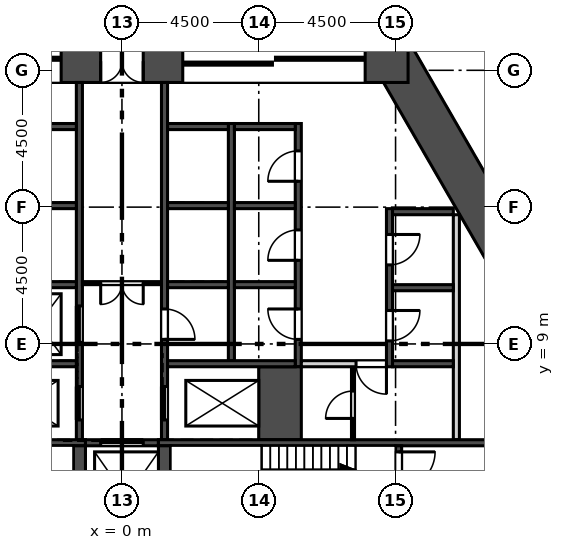
"""IFC4 building model, lengths in metres.
Left out: names, types, materials, properties, quantities, classifications, styles, units other than length and angle.
Written with IfcOpenShell. Run it as: python <this file> out.ifc"""

import sys

from ifc_helpers import new_model, si_unit, direction, frame, frame_2d, origin, place, context, subcontext, project, spatial, rectangle, extrude, element, fill, save


model = new_model("IFC4")
c1 = context("Model", 3, precision=1e-05, world=origin(), true_north=direction((0.0, 1.0)))
c2 = subcontext(c1, "Body", "Model", "MODEL_VIEW")
j1 = project(units=[si_unit("LENGTHUNIT", "METRE"), si_unit("PLANEANGLEUNIT", "RADIAN")], contexts=[c1])
p1 = place(None, origin())
s1 = spatial("IfcSite", under=j1, at=p1, CompositionType="ELEMENT")
p2 = place(p1, origin())
s2 = spatial("IfcBuilding", under=s1, at=p2, CompositionType="ELEMENT")
p3 = place(p2, frame((0.0, 0.0, 88.9)))
s3 = spatial("IfcBuildingStorey", under=s2, at=p3, CompositionType="ELEMENT", Elevation=88.9)
p4 = place(p3, frame((13.394, 10.703, 0.0), z_axis=(0.0, 0.0, 1.0), x_axis=(-0.50000187635, 0.866024320471, 0.0)))
e1 = element("IfcWall", 1, at=p4, inside=s3, PredefinedType="SHEAR", context=c2, shape_type="SweptSolid", body=[
    extrude(rectangle(XDim=9.177, YDim=1.4, at=frame_2d((4.588, 0.0))), origin(), (0.0, 0.0, 1.0), 7.2),
])
p5 = place(p3, frame((9.412, 18.3, 0.0), z_axis=(0.0, 0.0, 1.0), x_axis=(-1.0, 0.0, 0.0)))
e2 = element("IfcWall", 2, at=p5, inside=s3, PredefinedType="SHEAR", context=c2, shape_type="SweptSolid", body=[
    extrude(rectangle(XDim=18.823, YDim=1.4, at=frame_2d((9.412, 0.0))), origin(), (0.0, 0.0, 1.0), 7.2),
])
p6 = place(p5, frame((8.711, 0.0, 0.0)))
e3 = element("IfcOpeningElement", 3, at=p6, cuts=e2, PredefinedType="OPENING", context=c2, shape_type="SweptSolid", body=[
    extrude(rectangle(XDim=1.4, YDim=2.1, at=frame_2d((0.7, 1.05))), frame((0.0, 0.71, 0.0), z_axis=(0.0, -1.0, 0.0), x_axis=(1.0, 0.0, 0.0)), (0.0, 0.0, 1.0), 1.42),
])
p7 = place(p5, frame((11.412, 0.0, 0.0)))
e4 = element("IfcOpeningElement", 4, at=p7, cuts=e2, PredefinedType="OPENING", context=c2, shape_type="SweptSolid", body=[
    extrude(rectangle(XDim=6.0, YDim=2.4, at=frame_2d((3.0, 1.2))), frame((0.0, 0.71, 0.0), z_axis=(0.0, -1.0, 0.0), x_axis=(1.0, 0.0, 0.0)), (0.0, 0.0, 1.0), 1.42),
])
p8 = place(p5, frame((1.412, 0.0, 0.0)))
e5 = element("IfcOpeningElement", 5, at=p8, cuts=e2, PredefinedType="OPENING", context=c2, shape_type="SweptSolid", body=[
    extrude(rectangle(XDim=6.0, YDim=2.4, at=frame_2d((3.0, 1.2))), frame((0.0, 0.71, 0.0), z_axis=(0.0, -1.0, 0.0), x_axis=(1.0, 0.0, 0.0)), (0.0, 0.0, 1.0), 1.42),
])
p9 = place(p3, frame((30.863, 7.709, 0.0), z_axis=(0.0, 0.0, 1.0), x_axis=(-0.500000400847, 0.866025172355, 0.0)))
e6 = element("IfcWall", 6, at=p9, inside=s3, PredefinedType="SOLIDWALL", context=c2, shape_type="SweptSolid", body=[
    extrude(rectangle(XDim=53.021, YDim=0.34, at=frame_2d((26.51, 0.0))), origin(), (0.0, 0.0, 1.0), 6.8),
])
p10 = place(p9, frame((30.755, 0.0, 0.9)))
e7 = element("IfcOpeningElement", 7, at=p10, cuts=e6, PredefinedType="OPENING", context=c2, shape_type="SweptSolid", body=[
    extrude(rectangle(XDim=1.885, YDim=3.0, at=frame_2d((0.942, 1.5))), frame((0.0, 0.18, 0.0), z_axis=(0.0, -1.0, 0.0), x_axis=(1.0, 0.0, 0.0)), (0.0, 0.0, 1.0), 0.36),
])
p11 = place(p9, frame((36.755, 0.0, 0.9)))
e8 = element("IfcOpeningElement", 8, at=p11, cuts=e6, PredefinedType="OPENING", context=c2, shape_type="SweptSolid", body=[
    extrude(rectangle(XDim=1.885, YDim=3.0, at=frame_2d((0.942, 1.5))), frame((0.0, 0.18, 0.0), z_axis=(0.0, -1.0, 0.0), x_axis=(1.0, 0.0, 0.0)), (0.0, 0.0, 1.0), 0.36),
])
p12 = place(p9, frame((42.755, 0.0, 0.9)))
e9 = element("IfcOpeningElement", 9, at=p12, cuts=e6, PredefinedType="OPENING", context=c2, shape_type="SweptSolid", body=[
    extrude(rectangle(XDim=1.885, YDim=3.0, at=frame_2d((0.942, 1.5))), frame((0.0, 0.18, 0.0), z_axis=(0.0, -1.0, 0.0), x_axis=(1.0, 0.0, 0.0)), (0.0, 0.0, 1.0), 0.36),
])
p13 = place(p9, frame((48.755, 0.0, 0.9)))
e10 = element("IfcOpeningElement", 10, at=p13, cuts=e6, PredefinedType="OPENING", context=c2, shape_type="SweptSolid", body=[
    extrude(rectangle(XDim=1.885, YDim=3.0, at=frame_2d((0.942, 1.5))), frame((0.0, 0.18, 0.0), z_axis=(0.0, -1.0, 0.0), x_axis=(1.0, 0.0, 0.0)), (0.0, 0.0, 1.0), 0.36),
])
p14 = place(p3, frame((11.0, 5.85, 0.0), z_axis=(0.0, 0.0, 1.0), x_axis=(0.0, 1.0, 0.0)))
e11 = element("IfcWall", 11, at=p14, inside=s3, PredefinedType="SOLIDWALL", context=c2, shape_type="SweptSolid", body=[
    extrude(rectangle(XDim=7.4, YDim=0.2, at=frame_2d((3.7, 0.0))), origin(), (0.0, 0.0, 1.0), 6.8),
])
p15 = place(p3, frame((8.8, 8.25, -0.3), z_axis=(0.0, 0.0, 1.0), x_axis=(0.0, 1.0, 0.0)))
e12 = element("IfcWall", 12, at=p15, inside=s3, PredefinedType="SOLIDWALL", context=c2, shape_type="SweptSolid", body=[
    extrude(rectangle(XDim=5.2, YDim=0.2, at=frame_2d((2.6, 0.0))), origin(), (0.0, 0.0, 1.0), 7.1),
])
p16 = place(p15, frame((0.85, 0.0, 0.3)))
e13 = element("IfcOpeningElement", 13, at=p16, cuts=e12, PredefinedType="OPENING", context=c2, shape_type="SweptSolid", body=[
    extrude(rectangle(XDim=1.0, YDim=2.1, at=frame_2d((0.5, 1.05))), frame((0.0, 0.11, 0.0), z_axis=(0.0, -1.0, 0.0), x_axis=(1.0, 0.0, 0.0)), (0.0, 0.0, 1.0), 0.22),
])
p17 = place(p15, frame((3.35, 0.0, 0.3)))
e14 = element("IfcOpeningElement", 14, at=p17, cuts=e12, PredefinedType="OPENING", context=c2, shape_type="SweptSolid", body=[
    extrude(rectangle(XDim=1.0, YDim=2.1, at=frame_2d((0.5, 1.05))), frame((0.0, 0.11, 0.0), z_axis=(0.0, -1.0, 0.0), x_axis=(1.0, 0.0, 0.0)), (0.0, 0.0, 1.0), 0.22),
])
p18 = place(p3, frame((5.8, 8.25, -0.3), z_axis=(0.0, 0.0, 1.0), x_axis=(0.0, 1.0, 0.0)))
e15 = element("IfcWall", 15, at=p18, inside=s3, PredefinedType="SOLIDWALL", context=c2, shape_type="SweptSolid", body=[
    extrude(rectangle(XDim=8.0, YDim=0.2, at=frame_2d((4.0, 0.0))), origin(), (0.0, 0.0, 1.0), 7.1),
])
p19 = place(p18, frame((0.9, 0.0, 0.3)))
e16 = element("IfcOpeningElement", 16, at=p19, cuts=e15, PredefinedType="OPENING", context=c2, shape_type="SweptSolid", body=[
    extrude(rectangle(XDim=1.0, YDim=2.1, at=frame_2d((0.5, 1.05))), frame((0.0, 0.11, 0.0), z_axis=(0.0, -1.0, 0.0), x_axis=(1.0, 0.0, 0.0)), (0.0, 0.0, 1.0), 0.22),
])
p20 = place(p18, frame((3.5, 0.0, 0.3)))
e17 = element("IfcOpeningElement", 17, at=p20, cuts=e15, PredefinedType="OPENING", context=c2, shape_type="SweptSolid", body=[
    extrude(rectangle(XDim=1.0, YDim=2.1, at=frame_2d((0.5, 1.05))), frame((0.0, 0.11, 0.0), z_axis=(0.0, -1.0, 0.0), x_axis=(1.0, 0.0, 0.0)), (0.0, 0.0, 1.0), 0.22),
])
p21 = place(p18, frame((6.1, 0.0, 0.3)))
e18 = element("IfcOpeningElement", 18, at=p21, cuts=e15, PredefinedType="OPENING", context=c2, shape_type="SweptSolid", body=[
    extrude(rectangle(XDim=1.0, YDim=2.1, at=frame_2d((0.5, 1.05))), frame((0.0, 0.11, 0.0), z_axis=(0.0, -1.0, 0.0), x_axis=(1.0, 0.0, 0.0)), (0.0, 0.0, 1.0), 0.22),
])
p22 = place(p3, frame((3.6, 8.45, -0.3), z_axis=(0.0, 0.0, 1.0), x_axis=(0.0, 1.0, 0.0)))
e19 = element("IfcWall", 19, at=p22, inside=s3, PredefinedType="SOLIDWALL", context=c2, shape_type="SweptSolid", body=[
    extrude(rectangle(XDim=7.8, YDim=0.2, at=frame_2d((3.9, 0.0))), origin(), (0.0, 0.0, 1.0), 7.1),
])
p23 = place(p3, frame((-1.4, 5.85, -0.3), z_axis=(0.0, 0.0, 1.0), x_axis=(0.0, 1.0, 0.0)))
e20 = element("IfcWall", 20, at=p23, inside=s3, PredefinedType="SOLIDWALL", context=c2, shape_type="SweptSolid", body=[
    extrude(rectangle(XDim=11.75, YDim=0.2, at=frame_2d((5.875, 0.0))), origin(), (0.0, 0.0, 1.0), 7.1),
])
p24 = place(p23, frame((3.2, 0.0, 0.3)))
e21 = element("IfcOpeningElement", 21, at=p24, cuts=e20, PredefinedType="OPENING", context=c2, shape_type="SweptSolid", body=[
    extrude(rectangle(XDim=1.2, YDim=2.1, at=frame_2d((0.6, 1.05))), frame((0.0, 0.11, 0.0), z_axis=(0.0, -1.0, 0.0), x_axis=(1.0, 0.0, 0.0)), (0.0, 0.0, 1.0), 0.22),
])
p25 = place(p23, frame((0.65, 0.0, 0.3)))
e22 = element("IfcOpeningElement", 22, at=p25, cuts=e20, PredefinedType="OPENING", context=c2, shape_type="SweptSolid", body=[
    extrude(rectangle(XDim=1.1, YDim=2.1, at=frame_2d((0.55, 1.05))), frame((0.0, 0.11, 0.0), z_axis=(0.0, -1.0, 0.0), x_axis=(1.0, 0.0, 0.0)), (0.0, 0.0, 1.0), 0.22),
])
p26 = place(p3, frame((1.4, 5.85, -0.3), z_axis=(0.0, 0.0, 1.0), x_axis=(0.0, 1.0, 0.0)))
e23 = element("IfcWall", 23, at=p26, inside=s3, PredefinedType="SOLIDWALL", context=c2, shape_type="SweptSolid", body=[
    extrude(rectangle(XDim=11.75, YDim=0.2, at=frame_2d((5.875, 0.0))), origin(), (0.0, 0.0, 1.0), 7.1),
])
p27 = place(p26, frame((0.65, 0.0, 0.3)))
e24 = element("IfcOpeningElement", 24, at=p27, cuts=e23, PredefinedType="OPENING", context=c2, shape_type="SweptSolid", body=[
    extrude(rectangle(XDim=1.1, YDim=2.1, at=frame_2d((0.55, 1.05))), frame((0.0, 0.11, 0.0), z_axis=(0.0, -1.0, 0.0), x_axis=(1.0, 0.0, 0.0)), (0.0, 0.0, 1.0), 0.22),
])
p28 = place(p26, frame((3.3, 0.0, 0.3)))
e25 = element("IfcOpeningElement", 25, at=p28, cuts=e23, PredefinedType="OPENING", context=c2, shape_type="SweptSolid", body=[
    extrude(rectangle(XDim=1.0, YDim=2.1, at=frame_2d((0.5, 1.05))), frame((0.0, 0.11, 0.0), z_axis=(0.0, -1.0, 0.0), x_axis=(1.0, 0.0, 0.0)), (0.0, 0.0, 1.0), 0.22),
])
p29 = place(p3, frame((5.2, 5.85, -0.3), z_axis=(0.0, 0.0, 1.0), x_axis=(0.0, 1.0, 0.0)))
e26 = element("IfcWall", 26, at=p29, inside=s3, PredefinedType="SOLIDWALL", context=c2, shape_type="SweptSolid", body=[
    extrude(rectangle(XDim=2.4, YDim=1.4, at=frame_2d((1.2, 0.0))), origin(), (0.0, 0.0, 1.0), 7.1),
])
p30 = place(p3, frame((8.9, 8.35, -0.3), z_axis=(0.0, 0.0, 1.0), x_axis=(1.0, 0.0, 0.0)))
e27 = element("IfcWall", 27, at=p30, inside=s3, PredefinedType="SOLIDWALL", context=c2, shape_type="SweptSolid", body=[
    extrude(rectangle(XDim=2.0, YDim=0.2, at=frame_2d((1.0, 0.0))), origin(), (0.0, 0.0, 1.0), 7.1),
])
for number, where, z_axis, x_axis in (
    (28, (-5.7, 8.35, -0.3), (0.0, 0.0, 1.0), (1.0, 0.0, 0.0)),
    (29, (1.5, 8.35, -0.3), (0.0, 0.0, 1.0), (1.0, 0.0, 0.0)),
):
    element("IfcWall", number, at=place(p3, frame(where, z_axis=z_axis, x_axis=x_axis)), inside=s3, PredefinedType="SOLIDWALL", context=c2, shape_type="SweptSolid", body=[
        extrude(rectangle(XDim=4.2, YDim=0.2, at=frame_2d((2.1, 0.0))), origin(), (0.0, 0.0, 1.0), 7.1),
    ])
p31 = place(p3, frame((-12.6, 5.75, -0.3), z_axis=(0.0, 0.0, 1.0), x_axis=(1.0, 0.0, 0.0)))
e30 = element("IfcWall", 30, at=p31, inside=s3, PredefinedType="SOLIDWALL", context=c2, shape_type="SweptSolid", body=[
    extrude(rectangle(XDim=11.4, YDim=0.2, at=frame_2d((5.7, 0.0))), origin(), (0.0, 0.0, 1.0), 7.1),
])
p32 = place(p3, frame((-1.2, 5.75, -0.3), z_axis=(0.0, 0.0, 1.0), x_axis=(1.0, 0.0, 0.0)))
e31 = element("IfcWall", 31, at=p32, inside=s3, PredefinedType="SOLIDWALL", context=c2, shape_type="SweptSolid", body=[
    extrude(rectangle(XDim=2.4, YDim=0.2, at=frame_2d((1.2, 0.0))), origin(), (0.0, 0.0, 1.0), 7.1),
])
p33 = place(p32, frame((0.5, 0.0, 0.3)))
e32 = element("IfcOpeningElement", 32, at=p33, cuts=e31, PredefinedType="OPENING", context=c2, shape_type="SweptSolid", body=[
    extrude(rectangle(XDim=1.4, YDim=2.1, at=frame_2d((0.7, 1.05))), frame((0.0, 0.11, 0.0), z_axis=(0.0, -1.0, 0.0), x_axis=(1.0, 0.0, 0.0)), (0.0, 0.0, 1.0), 0.22),
])
p34 = place(p3, frame((1.2, 5.75, -0.3), z_axis=(0.0, 0.0, 1.0), x_axis=(1.0, 0.0, 0.0)))
e33 = element("IfcWall", 33, at=p34, inside=s3, PredefinedType="SOLIDWALL", context=c2, shape_type="SweptSolid", body=[
    extrude(rectangle(XDim=11.4, YDim=0.2, at=frame_2d((5.7, 0.0))), origin(), (0.0, 0.0, 1.0), 7.1),
])
p35 = place(p3, frame((9.1, 2.25, -0.3), z_axis=(0.0, 0.0, 1.0), x_axis=(0.0, 1.0, 0.0)))
e34 = element("IfcWall", 34, at=p35, inside=s3, PredefinedType="SOLIDWALL", context=c2, shape_type="SweptSolid", body=[
    extrude(rectangle(XDim=3.4, YDim=0.2, at=frame_2d((1.7, 0.0))), origin(), (0.0, 0.0, 1.0), 7.1),
])
p36 = place(p35, frame((0.2, 0.0, 0.3)))
e35 = element("IfcOpeningElement", 35, at=p36, cuts=e34, PredefinedType="OPENING", context=c2, shape_type="SweptSolid", body=[
    extrude(rectangle(XDim=1.2, YDim=2.1, at=frame_2d((0.6, 1.05))), frame((0.0, 0.11, 0.0), z_axis=(0.0, -1.0, 0.0), x_axis=(1.0, 0.0, 0.0)), (0.0, 0.0, 1.0), 0.22),
])
p37 = place(p35, frame((2.0, 0.0, 0.3)))
e36 = element("IfcOpeningElement", 36, at=p37, cuts=e34, PredefinedType="OPENING", context=c2, shape_type="SweptSolid", body=[
    extrude(rectangle(XDim=1.2, YDim=2.1, at=frame_2d((0.6, 1.05))), frame((0.0, 0.11, 0.0), z_axis=(0.0, -1.0, 0.0), x_axis=(1.0, 0.0, 0.0)), (0.0, 0.0, 1.0), 0.22),
])
for number, where, z_axis, x_axis in (
    (37, (-1.4, 2.25, -0.3), (0.0, 0.0, 1.0), (0.0, 1.0, 0.0)),
    (38, (1.4, 2.25, -0.3), (0.0, 0.0, 1.0), (0.0, 1.0, 0.0)),
):
    element("IfcWall", number, at=place(p3, frame(where, z_axis=z_axis, x_axis=x_axis)), inside=s3, PredefinedType="SOLIDWALL", context=c2, shape_type="SweptSolid", body=[
        extrude(rectangle(XDim=3.4, YDim=0.4, at=frame_2d((1.7, 0.0))), origin(), (0.0, 0.0, 1.0), 7.1),
    ])
for number, where, z_axis, x_axis in (
    (39, (-3.5, 10.95, -0.3), (0.0, 0.0, 1.0), (1.0, 0.0, 0.0)),
    (40, (-3.5, 13.55, -0.3), (0.0, 0.0, 1.0), (1.0, 0.0, 0.0)),
    (41, (-3.5, 16.15, -0.3), (0.0, 0.0, 1.0), (1.0, 0.0, 0.0)),
    (42, (8.9, 10.85, -0.3), (0.0, 0.0, 1.0), (1.0, 0.0, 0.0)),
    (43, (8.9, 13.35, -0.3), (0.0, 0.0, 1.0), (1.0, 0.0, 0.0)),
    (44, (3.7, 10.95, -0.3), (0.0, 0.0, 1.0), (1.0, 0.0, 0.0)),
    (45, (3.7, 13.55, -0.3), (0.0, 0.0, 1.0), (1.0, 0.0, 0.0)),
    (46, (3.7, 16.15, -0.3), (0.0, 0.0, 1.0), (1.0, 0.0, 0.0)),
    (47, (1.5, 10.95, -0.3), (0.0, 0.0, 1.0), (1.0, 0.0, 0.0)),
    (48, (1.5, 13.55, -0.3), (0.0, 0.0, 1.0), (1.0, 0.0, 0.0)),
    (49, (1.5, 16.15, -0.3), (0.0, 0.0, 1.0), (1.0, 0.0, 0.0)),
):
    element("IfcWall", number, at=place(p3, frame(where, z_axis=z_axis, x_axis=x_axis)), inside=s3, PredefinedType="SOLIDWALL", context=c2, shape_type="SweptSolid", body=[
        extrude(rectangle(XDim=2.0, YDim=0.2, at=frame_2d((1.0, 0.0))), origin(), (0.0, 0.0, 1.0), 7.1),
    ])
p38 = place(p3, frame((7.6, 5.85, 0.0), z_axis=(0.0, 0.0, 1.0), x_axis=(0.0, 1.0, 0.0)))
e50 = element("IfcWall", 50, at=p38, inside=s3, PredefinedType="PARTITIONING", context=c2, shape_type="SweptSolid", body=[
    extrude(rectangle(XDim=2.4, YDim=0.1, at=frame_2d((1.2, 0.0))), origin(), (0.0, 0.0, 1.0), 6.8),
])
p39 = place(p38, frame((0.7, 0.0, 0.0)))
e51 = element("IfcOpeningElement", 51, at=p39, cuts=e50, PredefinedType="OPENING", context=c2, shape_type="SweptSolid", body=[
    extrude(rectangle(XDim=0.9, YDim=2.1, at=frame_2d((0.45, 1.05))), frame((0.0, 0.06, 0.0), z_axis=(0.0, -1.0, 0.0), x_axis=(1.0, 0.0, 0.0)), (0.0, 0.0, 1.0), 0.12),
])
p40 = place(p3, frame((5.9, 8.35, 0.0), z_axis=(0.0, 0.0, 1.0), x_axis=(1.0, 0.0, 0.0)))
e52 = element("IfcWall", 52, at=p40, inside=s3, PredefinedType="SOLIDWALL", context=c2, shape_type="SweptSolid", body=[
    extrude(rectangle(XDim=2.8, YDim=0.2, at=frame_2d((1.4, 0.0))), origin(), (0.0, 0.0, 1.0), 6.8),
])
p41 = place(p40, frame((1.8, 0.0, 0.0)))
e53 = element("IfcOpeningElement", 53, at=p41, cuts=e52, PredefinedType="OPENING", context=c2, shape_type="SweptSolid", body=[
    extrude(rectangle(XDim=1.0, YDim=2.1, at=frame_2d((0.5, 1.05))), frame((0.0, 0.11, 0.0), z_axis=(0.0, -1.0, 0.0), x_axis=(1.0, 0.0, 0.0)), (0.0, 0.0, 1.0), 0.22),
])
p42 = place(p3, frame((-1.3, 11.0, 0.0), z_axis=(0.0, 0.0, 1.0), x_axis=(1.0, 0.0, 0.0)))
e54 = element("IfcWall", 54, at=p42, inside=s3, PredefinedType="PARTITIONING", context=c2, shape_type="SweptSolid", body=[
    extrude(rectangle(XDim=2.6, YDim=0.1, at=frame_2d((1.3, 0.0))), origin(), (0.0, 0.0, 1.0), 6.8),
])
p43 = place(p42, frame((0.6, 0.0, 0.0)))
e55 = element("IfcOpeningElement", 55, at=p43, cuts=e54, PredefinedType="OPENING", context=c2, shape_type="SweptSolid", body=[
    extrude(rectangle(XDim=1.4, YDim=2.1, at=frame_2d((0.7, 1.05))), frame((0.0, 0.06, 0.0), z_axis=(0.0, -1.0, 0.0), x_axis=(1.0, 0.0, 0.0)), (0.0, 0.0, 1.0), 0.12),
])
p44 = place(p24, origin())
e56 = element("IfcDoor", 56, at=p44, inside=s3, OperationType="SLIDING_TO_LEFT", PredefinedType="DOOR", context=c2, shape_type="SweptSolid", body=[
    extrude(rectangle(XDim=1.2, YDim=2.1, at=frame_2d((0.6, 1.05))), frame((0.0, 0.025, 0.0), z_axis=(0.0, -1.0, 0.0), x_axis=(1.0, 0.0, 0.0)), (0.0, 0.0, 1.0), 0.05),
])
fill(e21, e56)
p45 = place(p25, origin())
e57 = element("IfcDoor", 57, at=p45, inside=s3, OperationType="SLIDING_TO_RIGHT", PredefinedType="DOOR", context=c2, shape_type="SweptSolid", body=[
    extrude(rectangle(XDim=1.1, YDim=2.1, at=frame_2d((0.55, 1.05))), frame((0.0, 0.025, 0.0), z_axis=(0.0, -1.0, 0.0), x_axis=(1.0, 0.0, 0.0)), (0.0, 0.0, 1.0), 0.05),
])
fill(e22, e57)
p46 = place(p27, origin())
e58 = element("IfcDoor", 58, at=p46, inside=s3, OperationType="SLIDING_TO_RIGHT", PredefinedType="DOOR", context=c2, shape_type="SweptSolid", body=[
    extrude(rectangle(XDim=1.1, YDim=2.1, at=frame_2d((0.55, 1.05))), frame((0.0, 0.025, 0.0), z_axis=(0.0, -1.0, 0.0), x_axis=(1.0, 0.0, 0.0)), (0.0, 0.0, 1.0), 0.05),
])
fill(e24, e58)
p47 = place(p33, origin())
e59 = element("IfcDoor", 59, at=p47, inside=s3, OperationType="SLIDING_TO_LEFT", PredefinedType="DOOR", context=c2, shape_type="SweptSolid", body=[
    extrude(rectangle(XDim=1.4, YDim=2.1, at=frame_2d((0.7, 1.05))), frame((0.0, 0.025, 0.0), z_axis=(0.0, -1.0, 0.0), x_axis=(1.0, 0.0, 0.0)), (0.0, 0.0, 1.0), 0.05),
])
fill(e32, e59)
p48 = place(p16, frame((1.0, 0.0, 0.0), z_axis=(0.0, 0.0, 1.0), x_axis=(-1.0, 0.0, 0.0)))
e60 = element("IfcDoor", 60, at=p48, inside=s3, OperationType="SINGLE_SWING_LEFT", PredefinedType="DOOR", context=c2, shape_type="SweptSolid", body=[
    extrude(rectangle(XDim=1.0, YDim=2.1, at=frame_2d((0.5, 1.05))), frame((0.0, 0.025, 0.0), z_axis=(0.0, -1.0, 0.0), x_axis=(1.0, 0.0, 0.0)), (0.0, 0.0, 1.0), 0.05),
])
fill(e13, e60)
p49 = place(p17, frame((1.0, 0.0, 0.0), z_axis=(0.0, 0.0, 1.0), x_axis=(-1.0, 0.0, 0.0)))
e61 = element("IfcDoor", 61, at=p49, inside=s3, OperationType="SINGLE_SWING_LEFT", PredefinedType="DOOR", context=c2, shape_type="SweptSolid", body=[
    extrude(rectangle(XDim=1.0, YDim=2.1, at=frame_2d((0.5, 1.05))), frame((0.0, 0.025, 0.0), z_axis=(0.0, -1.0, 0.0), x_axis=(1.0, 0.0, 0.0)), (0.0, 0.0, 1.0), 0.05),
])
fill(e14, e61)
p50 = place(p19, origin())
e62 = element("IfcDoor", 62, at=p50, inside=s3, OperationType="SINGLE_SWING_RIGHT", PredefinedType="DOOR", context=c2, shape_type="SweptSolid", body=[
    extrude(rectangle(XDim=1.0, YDim=2.1, at=frame_2d((0.5, 1.05))), frame((0.0, 0.025, 0.0), z_axis=(0.0, -1.0, 0.0), x_axis=(1.0, 0.0, 0.0)), (0.0, 0.0, 1.0), 0.05),
])
fill(e16, e62)
p51 = place(p20, origin())
e63 = element("IfcDoor", 63, at=p51, inside=s3, OperationType="SINGLE_SWING_LEFT", PredefinedType="DOOR", context=c2, shape_type="SweptSolid", body=[
    extrude(rectangle(XDim=1.0, YDim=2.1, at=frame_2d((0.5, 1.05))), frame((0.0, 0.025, 0.0), z_axis=(0.0, -1.0, 0.0), x_axis=(1.0, 0.0, 0.0)), (0.0, 0.0, 1.0), 0.05),
])
fill(e17, e63)
p52 = place(p21, origin())
e64 = element("IfcDoor", 64, at=p52, inside=s3, OperationType="SINGLE_SWING_LEFT", PredefinedType="DOOR", context=c2, shape_type="SweptSolid", body=[
    extrude(rectangle(XDim=1.0, YDim=2.1, at=frame_2d((0.5, 1.05))), frame((0.0, 0.025, 0.0), z_axis=(0.0, -1.0, 0.0), x_axis=(1.0, 0.0, 0.0)), (0.0, 0.0, 1.0), 0.05),
])
fill(e18, e64)
p53 = place(p28, frame((1.0, 0.0, 0.0), z_axis=(0.0, 0.0, 1.0), x_axis=(-1.0, 0.0, 0.0)))
e65 = element("IfcDoor", 65, at=p53, inside=s3, OperationType="SINGLE_SWING_RIGHT", PredefinedType="DOOR", context=c2, shape_type="SweptSolid", body=[
    extrude(rectangle(XDim=1.0, YDim=2.1, at=frame_2d((0.5, 1.05))), frame((0.0, 0.025, 0.0), z_axis=(0.0, -1.0, 0.0), x_axis=(1.0, 0.0, 0.0)), (0.0, 0.0, 1.0), 0.05),
])
fill(e25, e65)
p54 = place(p41, frame((1.0, 0.0, 0.0), z_axis=(0.0, 0.0, 1.0), x_axis=(-1.0, 0.0, 0.0)))
e66 = element("IfcDoor", 66, at=p54, inside=s3, OperationType="SINGLE_SWING_LEFT", PredefinedType="DOOR", context=c2, shape_type="SweptSolid", body=[
    extrude(rectangle(XDim=1.0, YDim=2.1, at=frame_2d((0.5, 1.05))), frame((0.0, 0.025, 0.0), z_axis=(0.0, -1.0, 0.0), x_axis=(1.0, 0.0, 0.0)), (0.0, 0.0, 1.0), 0.05),
])
fill(e53, e66)
p55 = place(p39, origin())
e67 = element("IfcDoor", 67, at=p55, inside=s3, OperationType="SINGLE_SWING_LEFT", PredefinedType="DOOR", context=c2, shape_type="SweptSolid", body=[
    extrude(rectangle(XDim=0.9, YDim=2.1, at=frame_2d((0.45, 1.05))), frame((0.0, 0.025, 0.0), z_axis=(0.0, -1.0, 0.0), x_axis=(1.0, 0.0, 0.0)), (0.0, 0.0, 1.0), 0.05),
])
fill(e51, e67)
p56 = place(p43, frame((1.4, 0.0, 0.0), z_axis=(0.0, 0.0, 1.0), x_axis=(-1.0, 0.0, 0.0)))
e68 = element("IfcDoor", 68, at=p56, inside=s3, OperationType="DOUBLE_DOOR_SINGLE_SWING", PredefinedType="DOOR", context=c2, shape_type="SweptSolid", body=[
    extrude(rectangle(XDim=1.4, YDim=2.1, at=frame_2d((0.7, 1.05))), frame((0.0, 0.025, 0.0), z_axis=(0.0, -1.0, 0.0), x_axis=(1.0, 0.0, 0.0)), (0.0, 0.0, 1.0), 0.05),
])
fill(e55, e68)
p57 = place(p6, origin())
e69 = element("IfcDoor", 69, at=p57, inside=s3, OperationType="DOUBLE_DOOR_SINGLE_SWING", PredefinedType="DOOR", context=c2, shape_type="SweptSolid", body=[
    extrude(rectangle(XDim=1.4, YDim=2.1, at=frame_2d((0.7, 1.05))), frame((0.0, 0.025, 0.0), z_axis=(0.0, -1.0, 0.0), x_axis=(1.0, 0.0, 0.0)), (0.0, 0.0, 1.0), 0.05),
])
fill(e3, e69)
p58 = place(p7, origin())
e70 = element("IfcDoor", 70, at=p58, inside=s3, OperationType="DOUBLE_DOOR_SLIDING", PredefinedType="DOOR", context=c2, shape_type="SweptSolid", body=[
    extrude(rectangle(XDim=6.0, YDim=2.4, at=frame_2d((3.0, 1.2))), frame((0.0, 0.025, 0.0), z_axis=(0.0, -1.0, 0.0), x_axis=(1.0, 0.0, 0.0)), (0.0, 0.0, 1.0), 0.05),
])
fill(e4, e70)
p59 = place(p8, origin())
e71 = element("IfcDoor", 71, at=p59, inside=s3, OperationType="DOUBLE_DOOR_SLIDING", PredefinedType="DOOR", context=c2, shape_type="SweptSolid", body=[
    extrude(rectangle(XDim=6.0, YDim=2.4, at=frame_2d((3.0, 1.2))), frame((0.0, 0.025, 0.0), z_axis=(0.0, -1.0, 0.0), x_axis=(1.0, 0.0, 0.0)), (0.0, 0.0, 1.0), 0.05),
])
fill(e5, e71)
p60 = place(p37, frame((1.2, 0.0, 0.0), z_axis=(0.0, 0.0, 1.0), x_axis=(-1.0, 0.0, 0.0)))
e72 = element("IfcDoor", 72, at=p60, inside=s3, OperationType="SINGLE_SWING_LEFT", PredefinedType="DOOR", context=c2, shape_type="SweptSolid", body=[
    extrude(rectangle(XDim=1.2, YDim=2.1, at=frame_2d((0.6, 1.05))), frame((0.0, 0.025, 0.0), z_axis=(0.0, -1.0, 0.0), x_axis=(1.0, 0.0, 0.0)), (0.0, 0.0, 1.0), 0.05),
])
fill(e36, e72)
save(model, sys.argv[1])
